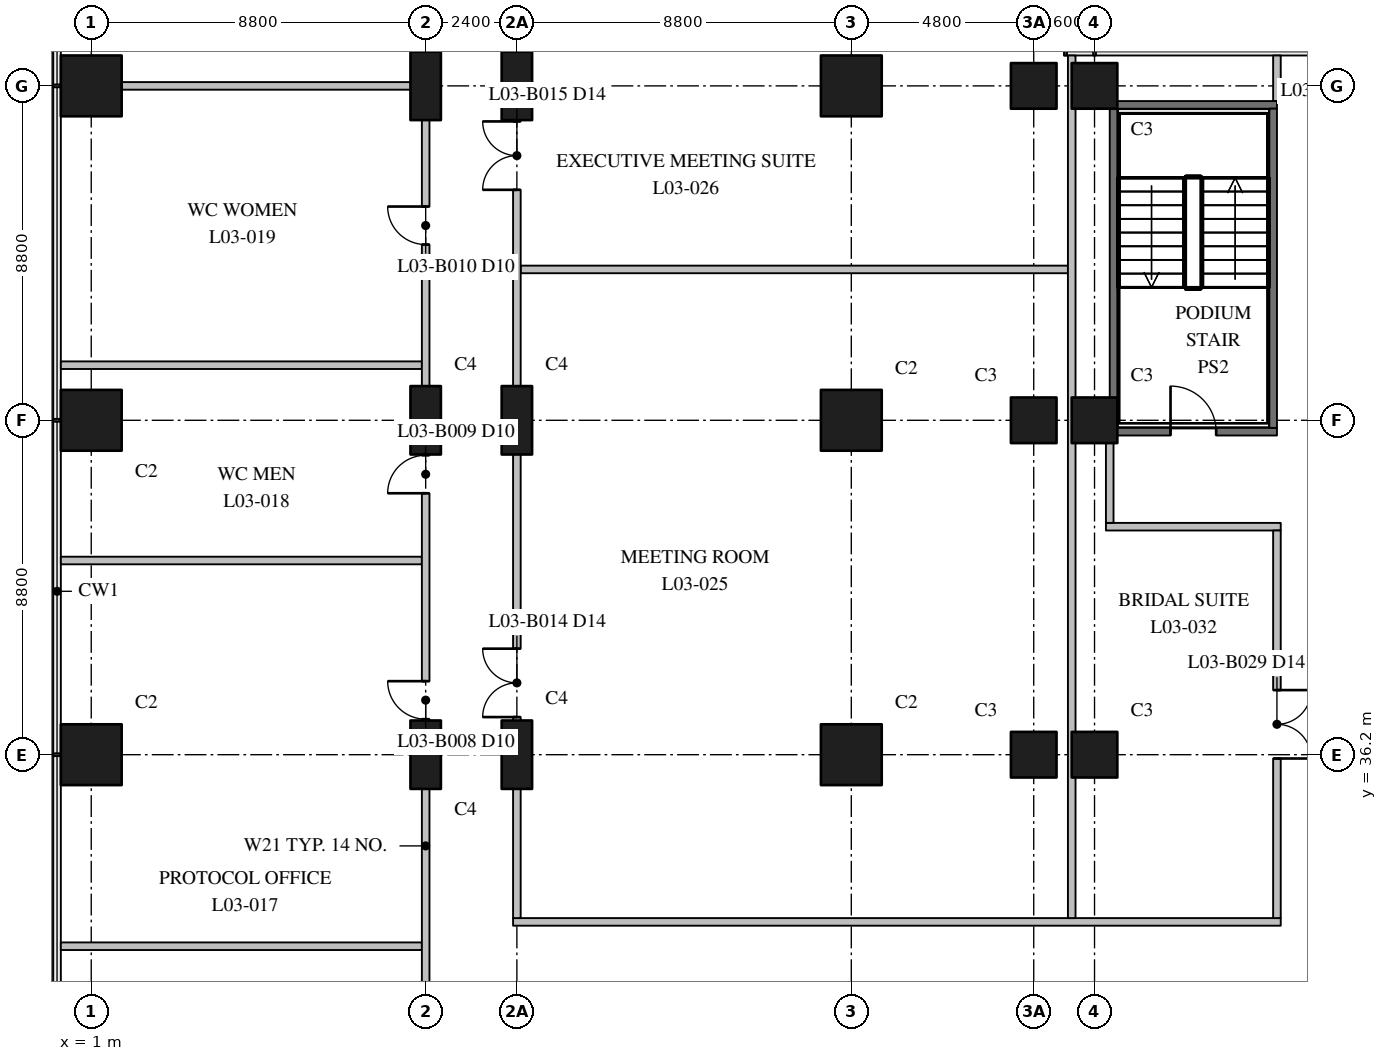
"""IFC4 building model, lengths in metres.
Left out: names, types, materials, properties, quantities, classifications, styles, units other than length and angle.
Written with IfcOpenShell. Run it as: python <this file> out.ifc"""

import sys

from ifc_helpers import new_model, si_unit, direction, frame, frame_2d, origin, origin_2d, place, context, subcontext, project, spatial, rectangle, extrude, element, fill, save


model = new_model("IFC4")
c1 = context("Model", 3, precision=1e-05, world=origin(), true_north=direction((0.0, 1.0)))
c2 = subcontext(c1, "Body", "Model", "MODEL_VIEW")
j1 = project(units=[si_unit("LENGTHUNIT", "METRE"), si_unit("PLANEANGLEUNIT", "RADIAN")], contexts=[c1])
p1 = place(None, origin())
s1 = spatial("IfcSite", under=j1, at=p1, CompositionType="ELEMENT")
p2 = place(p1, origin())
s2 = spatial("IfcBuilding", under=s1, at=p2, CompositionType="ELEMENT")
p3 = place(p2, frame((0.0, 0.0, 18.0)))
s3 = spatial("IfcBuildingStorey", under=s2, at=p3, CompositionType="ELEMENT", Elevation=18.0)
for number, where, z_axis, x_axis in (
    (1, (1.0, 36.2, 0.0), (0.0, 0.0, 1.0), (1.0, 0.0, 0.0)),
    (2, (1.0, 45.0, 0.0), (0.0, 0.0, 1.0), (1.0, 0.0, 0.0)),
    (3, (1.0, 53.8, 0.0), (0.0, 0.0, 1.0), (1.0, 0.0, 0.0)),
):
    element("IfcColumn", number, at=place(p3, frame(where, z_axis=z_axis, x_axis=x_axis)), inside=s3, PredefinedType="COLUMN", context=c2, shape_type="SweptSolid", body=[
        extrude(rectangle(XDim=1.6, YDim=1.6, at=origin_2d()), origin(), (0.0, 0.0, 1.0), 5.5),
    ])
for number, where, z_axis, x_axis in (
    (4, (9.8, 36.2, 0.0), (0.0, 0.0, 1.0), (0.0, 1.0, 0.0)),
    (5, (9.8, 45.0, 0.0), (0.0, 0.0, 1.0), (0.0, 1.0, 0.0)),
    (6, (9.8, 53.8, 0.0), (0.0, 0.0, 1.0), (0.0, 1.0, 0.0)),
    (7, (12.2, 36.2, 0.0), (0.0, 0.0, 1.0), (0.0, 1.0, 0.0)),
    (8, (12.2, 45.0, 0.0), (0.0, 0.0, 1.0), (0.0, 1.0, 0.0)),
    (9, (12.2, 53.8, 0.0), (0.0, 0.0, 1.0), (0.0, 1.0, 0.0)),
):
    element("IfcColumn", number, at=place(p3, frame(where, z_axis=z_axis, x_axis=x_axis)), inside=s3, PredefinedType="COLUMN", context=c2, shape_type="SweptSolid", body=[
        extrude(rectangle(XDim=1.8, YDim=0.8, at=origin_2d()), origin(), (0.0, 0.0, 1.0), 5.5),
    ])
for number, where, z_axis, x_axis in (
    (10, (21.0, 36.2, 0.0), (0.0, 0.0, 1.0), (1.0, 0.0, 0.0)),
    (11, (21.0, 45.0, 0.0), (0.0, 0.0, 1.0), (1.0, 0.0, 0.0)),
    (12, (21.0, 53.8, 0.0), (0.0, 0.0, 1.0), (1.0, 0.0, 0.0)),
):
    element("IfcColumn", number, at=place(p3, frame(where, z_axis=z_axis, x_axis=x_axis)), inside=s3, PredefinedType="COLUMN", context=c2, shape_type="SweptSolid", body=[
        extrude(rectangle(XDim=1.6, YDim=1.6, at=origin_2d()), origin(), (0.0, 0.0, 1.0), 5.5),
    ])
for number, where, z_axis, x_axis in (
    (13, (25.8, 36.2, 0.0), (0.0, 0.0, 1.0), (1.0, 0.0, 0.0)),
    (14, (25.8, 45.0, 0.0), (0.0, 0.0, 1.0), (1.0, 0.0, 0.0)),
    (15, (25.8, 53.8, 0.0), (0.0, 0.0, 1.0), (1.0, 0.0, 0.0)),
    (16, (27.4, 36.2, 0.0), (0.0, 0.0, 1.0), (1.0, 0.0, 0.0)),
    (17, (27.4, 45.0, 0.0), (0.0, 0.0, 1.0), (1.0, 0.0, 0.0)),
    (18, (27.4, 53.8, 0.0), (0.0, 0.0, 1.0), (1.0, 0.0, 0.0)),
):
    element("IfcColumn", number, at=place(p3, frame(where, z_axis=z_axis, x_axis=x_axis)), inside=s3, PredefinedType="COLUMN", context=c2, shape_type="SweptSolid", body=[
        extrude(rectangle(XDim=1.2, YDim=1.2, at=origin_2d()), origin(), (0.0, 0.0, 1.0), 5.5),
    ])
p4 = place(p3, frame((27.8, 44.7, 0.0), z_axis=(0.0, 0.0, 1.0), x_axis=(1.0, 0.0, 0.0)))
e19 = element("IfcWall", 19, at=p4, inside=s3, PredefinedType="SHEAR", context=c2, shape_type="SweptSolid", body=[
    extrude(rectangle(XDim=4.4, YDim=0.2, at=frame_2d((2.2, 0.0))), origin(), (0.0, 0.0, 1.0), 5.1),
])
p5 = place(p4, frame((1.6, 0.0, 0.0)))
e20 = element("IfcOpeningElement", 20, at=p5, cuts=e19, PredefinedType="OPENING", context=c2, shape_type="SweptSolid", body=[
    extrude(rectangle(XDim=1.2, YDim=2.1, at=frame_2d((0.6, 1.05))), frame((0.0, 0.11, 0.0), z_axis=(0.0, -1.0, 0.0), x_axis=(1.0, 0.0, 0.0)), (0.0, 0.0, 1.0), 0.22),
])
p6 = place(p3, frame((27.8, 53.3, 0.0), z_axis=(0.0, 0.0, 1.0), x_axis=(1.0, 0.0, 0.0)))
e21 = element("IfcWall", 21, at=p6, inside=s3, PredefinedType="SHEAR", context=c2, shape_type="SweptSolid", body=[
    extrude(rectangle(XDim=4.4, YDim=0.2, at=frame_2d((2.2, 0.0))), origin(), (0.0, 0.0, 1.0), 5.1),
])
for number, where, z_axis, x_axis in (
    (22, (27.9, 44.8, 0.0), (0.0, 0.0, 1.0), (0.0, 1.0, 0.0)),
    (23, (32.1, 44.8, 0.0), (0.0, 0.0, 1.0), (0.0, 1.0, 0.0)),
):
    element("IfcWall", number, at=place(p3, frame(where, z_axis=z_axis, x_axis=x_axis)), inside=s3, PredefinedType="SHEAR", context=c2, shape_type="SweptSolid", body=[
        extrude(rectangle(XDim=8.4, YDim=0.2, at=frame_2d((4.2, 0.0))), origin(), (0.0, 0.0, 1.0), 5.1),
    ])
p7 = place(p3, frame((12.1, 31.8, 0.0), z_axis=(0.0, 0.0, 1.0), x_axis=(1.0, 0.0, 0.0)))
e24 = element("IfcWall", 24, at=p7, inside=s3, PredefinedType="PARTITIONING", context=c2, shape_type="SweptSolid", body=[
    extrude(rectangle(XDim=20.2, YDim=0.2, at=frame_2d((10.1, 0.0))), origin(), (0.0, 0.0, 1.0), 5.1),
])
p8 = place(p3, frame((27.7, 42.2, 0.0), z_axis=(0.0, 0.0, 1.0), x_axis=(1.0, 0.0, 0.0)))
e25 = element("IfcWall", 25, at=p8, inside=s3, PredefinedType="PARTITIONING", context=c2, shape_type="SweptSolid", body=[
    extrude(rectangle(XDim=4.6, YDim=0.2, at=frame_2d((2.3, 0.0))), origin(), (0.0, 0.0, 1.0), 5.1),
])
for number, where, z_axis, x_axis in (
    (26, (0.2, 31.16, 0.0), (0.0, 0.0, 1.0), (1.0, 0.0, 0.0)),
    (27, (0.2, 41.31, 0.0), (0.0, 0.0, 1.0), (1.0, 0.0, 0.0)),
    (28, (0.2, 46.45, 0.0), (0.0, 0.0, 1.0), (1.0, 0.0, 0.0)),
    (29, (0.2, 53.8, 0.0), (0.0, 0.0, 1.0), (1.0, 0.0, 0.0)),
):
    element("IfcWall", number, at=place(p3, frame(where, z_axis=z_axis, x_axis=x_axis)), inside=s3, PredefinedType="PARTITIONING", context=c2, shape_type="SweptSolid", body=[
        extrude(rectangle(XDim=9.5, YDim=0.2, at=frame_2d((4.75, 0.0))), origin(), (0.0, 0.0, 1.0), 5.1),
    ])
p9 = place(p3, frame((12.3, 48.97, 0.0), z_axis=(0.0, 0.0, 1.0), x_axis=(1.0, 0.0, 0.0)))
e30 = element("IfcWall", 30, at=p9, inside=s3, PredefinedType="PARTITIONING", context=c2, shape_type="SweptSolid", body=[
    extrude(rectangle(XDim=14.4, YDim=0.2, at=frame_2d((7.2, 0.0))), origin(), (0.0, 0.0, 1.0), 5.1),
])
p10 = place(p3, frame((9.8, 9.8, 0.0), z_axis=(0.0, 0.0, 1.0), x_axis=(0.0, 1.0, 0.0)))
e31 = element("IfcWall", 31, at=p10, inside=s3, PredefinedType="PARTITIONING", context=c2, shape_type="SweptSolid", body=[
    extrude(rectangle(XDim=48.0, YDim=0.2, at=frame_2d((24.0, 0.0))), origin(), (0.0, 0.0, 1.0), 5.1),
])
p11 = place(p10, frame((7.635, 0.0, 0.0)))
e32 = element("IfcOpeningElement", 32, at=p11, cuts=e31, PredefinedType="OPENING", context=c2, shape_type="SweptSolid", body=[
    extrude(rectangle(XDim=1.0, YDim=2.1, at=frame_2d((0.5, 1.05))), frame((0.0, 0.11, 0.0), z_axis=(0.0, -1.0, 0.0), x_axis=(1.0, 0.0, 0.0)), (0.0, 0.0, 1.0), 0.22),
])
p12 = place(p10, frame((27.335, 0.0, 0.0)))
e33 = element("IfcOpeningElement", 33, at=p12, cuts=e31, PredefinedType="OPENING", context=c2, shape_type="SweptSolid", body=[
    extrude(rectangle(XDim=1.0, YDim=2.1, at=frame_2d((0.5, 1.05))), frame((0.0, 0.11, 0.0), z_axis=(0.0, -1.0, 0.0), x_axis=(1.0, 0.0, 0.0)), (0.0, 0.0, 1.0), 0.22),
])
p13 = place(p10, frame((33.28, 0.0, 0.0)))
e34 = element("IfcOpeningElement", 34, at=p13, cuts=e31, PredefinedType="OPENING", context=c2, shape_type="SweptSolid", body=[
    extrude(rectangle(XDim=1.0, YDim=2.1, at=frame_2d((0.5, 1.05))), frame((0.0, 0.11, 0.0), z_axis=(0.0, -1.0, 0.0), x_axis=(1.0, 0.0, 0.0)), (0.0, 0.0, 1.0), 0.22),
])
p14 = place(p10, frame((39.825, 0.0, 0.0)))
e35 = element("IfcOpeningElement", 35, at=p14, cuts=e31, PredefinedType="OPENING", context=c2, shape_type="SweptSolid", body=[
    extrude(rectangle(XDim=1.0, YDim=2.1, at=frame_2d((0.5, 1.05))), frame((0.0, 0.11, 0.0), z_axis=(0.0, -1.0, 0.0), x_axis=(1.0, 0.0, 0.0)), (0.0, 0.0, 1.0), 0.22),
])
p15 = place(p10, frame((44.967, 0.0, 0.0)))
e36 = element("IfcOpeningElement", 36, at=p15, cuts=e31, PredefinedType="OPENING", context=c2, shape_type="SweptSolid", body=[
    extrude(rectangle(XDim=1.0, YDim=2.1, at=frame_2d((0.5, 1.05))), frame((0.0, 0.11, 0.0), z_axis=(0.0, -1.0, 0.0), x_axis=(1.0, 0.0, 0.0)), (0.0, 0.0, 1.0), 0.22),
])
p16 = place(p10, frame((0.4, 0.0, 0.0)))
e37 = element("IfcOpeningElement", 37, at=p16, cuts=e31, PredefinedType="OPENING", context=c2, shape_type="SweptSolid", body=[
    extrude(rectangle(XDim=1.0, YDim=2.1, at=frame_2d((0.5, 1.05))), frame((0.0, 0.11, 0.0), z_axis=(0.0, -1.0, 0.0), x_axis=(1.0, 0.0, 0.0)), (0.0, 0.0, 1.0), 0.22),
])
p17 = place(p3, frame((12.2, 31.9, 0.0), z_axis=(0.0, 0.0, 1.0), x_axis=(0.0, 1.0, 0.0)))
e38 = element("IfcWall", 38, at=p17, inside=s3, PredefinedType="PARTITIONING", context=c2, shape_type="SweptSolid", body=[
    extrude(rectangle(XDim=46.3, YDim=0.2, at=frame_2d((23.15, 0.0))), origin(), (0.0, 0.0, 1.0), 5.1),
])
p18 = place(p17, frame((5.29, 0.0, 0.0)))
e39 = element("IfcOpeningElement", 39, at=p18, cuts=e38, PredefinedType="OPENING", context=c2, shape_type="SweptSolid", body=[
    extrude(rectangle(XDim=1.8, YDim=2.4, at=frame_2d((0.9, 1.2))), frame((0.0, 0.11, 0.0), z_axis=(0.0, -1.0, 0.0), x_axis=(1.0, 0.0, 0.0)), (0.0, 0.0, 1.0), 0.22),
])
p19 = place(p17, frame((19.165, 0.0, 0.0)))
e40 = element("IfcOpeningElement", 40, at=p19, cuts=e38, PredefinedType="OPENING", context=c2, shape_type="SweptSolid", body=[
    extrude(rectangle(XDim=1.8, YDim=2.4, at=frame_2d((0.9, 1.2))), frame((0.0, 0.11, 0.0), z_axis=(0.0, -1.0, 0.0), x_axis=(1.0, 0.0, 0.0)), (0.0, 0.0, 1.0), 0.22),
])
p20 = place(p17, frame((27.895, 0.0, 0.0)))
e41 = element("IfcOpeningElement", 41, at=p20, cuts=e38, PredefinedType="OPENING", context=c2, shape_type="SweptSolid", body=[
    extrude(rectangle(XDim=1.8, YDim=2.4, at=frame_2d((0.9, 1.2))), frame((0.0, 0.11, 0.0), z_axis=(0.0, -1.0, 0.0), x_axis=(1.0, 0.0, 0.0)), (0.0, 0.0, 1.0), 0.22),
])
p21 = place(p17, frame((35.025, 0.0, 0.0)))
e42 = element("IfcOpeningElement", 42, at=p21, cuts=e38, PredefinedType="OPENING", context=c2, shape_type="SweptSolid", body=[
    extrude(rectangle(XDim=1.0, YDim=2.1, at=frame_2d((0.5, 1.05))), frame((0.0, 0.11, 0.0), z_axis=(0.0, -1.0, 0.0), x_axis=(1.0, 0.0, 0.0)), (0.0, 0.0, 1.0), 0.22),
])
p22 = place(p17, frame((41.71, 0.0, 0.0)))
e43 = element("IfcOpeningElement", 43, at=p22, cuts=e38, PredefinedType="OPENING", context=c2, shape_type="SweptSolid", body=[
    extrude(rectangle(XDim=1.8, YDim=2.1, at=frame_2d((0.9, 1.05))), frame((0.0, 0.11, 0.0), z_axis=(0.0, -1.0, 0.0), x_axis=(1.0, 0.0, 0.0)), (0.0, 0.0, 1.0), 0.22),
])
p23 = place(p3, frame((32.2, 31.9, 0.0), z_axis=(0.0, 0.0, 1.0), x_axis=(0.0, 1.0, 0.0)))
e44 = element("IfcWall", 44, at=p23, inside=s3, PredefinedType="PARTITIONING", context=c2, shape_type="SweptSolid", body=[
    extrude(rectangle(XDim=10.2, YDim=0.2, at=frame_2d((5.1, 0.0))), origin(), (0.0, 0.0, 1.0), 5.1),
])
p24 = place(p23, frame((4.2, 0.0, 0.0)))
e45 = element("IfcOpeningElement", 45, at=p24, cuts=e44, PredefinedType="OPENING", context=c2, shape_type="SweptSolid", body=[
    extrude(rectangle(XDim=1.8, YDim=2.4, at=frame_2d((0.9, 1.2))), frame((0.0, 0.11, 0.0), z_axis=(0.0, -1.0, 0.0), x_axis=(1.0, 0.0, 0.0)), (0.0, 0.0, 1.0), 0.22),
])
p25 = place(p3, frame((32.2, 53.4, 0.0), z_axis=(0.0, 0.0, 1.0), x_axis=(0.0, 1.0, 0.0)))
e46 = element("IfcWall", 46, at=p25, inside=s3, PredefinedType="PARTITIONING", context=c2, shape_type="SweptSolid", body=[
    extrude(rectangle(XDim=1.2, YDim=0.2, at=frame_2d((0.6, 0.0))), origin(), (0.0, 0.0, 1.0), 5.1),
])
p26 = place(p3, frame((27.8, 42.3, 0.0), z_axis=(0.0, 0.0, 1.0), x_axis=(0.0, 1.0, 0.0)))
e47 = element("IfcWall", 47, at=p26, inside=s3, PredefinedType="PARTITIONING", context=c2, shape_type="SweptSolid", body=[
    extrude(rectangle(XDim=2.3, YDim=0.2, at=frame_2d((1.15, 0.0))), origin(), (0.0, 0.0, 1.0), 5.1),
])
p27 = place(p3, frame((26.8, 31.9, 0.0), z_axis=(0.0, 0.0, 1.0), x_axis=(0.0, 1.0, 0.0)))
e48 = element("IfcWall", 48, at=p27, inside=s3, PredefinedType="PARTITIONING", context=c2, shape_type="SweptSolid", body=[
    extrude(rectangle(XDim=22.7, YDim=0.2, at=frame_2d((11.35, 0.0))), origin(), (0.0, 0.0, 1.0), 5.1),
])
p28 = place(p5, origin())
e49 = element("IfcDoor", 49, at=p28, inside=s3, OperationType="SINGLE_SWING_LEFT", PredefinedType="DOOR", context=c2, shape_type="SweptSolid", body=[
    extrude(rectangle(XDim=1.2, YDim=2.1, at=frame_2d((0.6, 1.05))), frame((0.0, 0.025, 0.0), z_axis=(0.0, -1.0, 0.0), x_axis=(1.0, 0.0, 0.0)), (0.0, 0.0, 1.0), 0.05),
])
fill(e20, e49)
p29 = place(p12, origin())
e50 = element("IfcDoor", 50, at=p29, inside=s3, OperationType="SINGLE_SWING_RIGHT", PredefinedType="DOOR", context=c2, shape_type="SweptSolid", body=[
    extrude(rectangle(XDim=1.0, YDim=2.1, at=frame_2d((0.5, 1.05))), frame((0.0, 0.025, 0.0), z_axis=(0.0, -1.0, 0.0), x_axis=(1.0, 0.0, 0.0)), (0.0, 0.0, 1.0), 0.05),
])
fill(e33, e50)
p30 = place(p13, origin())
e51 = element("IfcDoor", 51, at=p30, inside=s3, OperationType="SINGLE_SWING_LEFT", PredefinedType="DOOR", context=c2, shape_type="SweptSolid", body=[
    extrude(rectangle(XDim=1.0, YDim=2.1, at=frame_2d((0.5, 1.05))), frame((0.0, 0.025, 0.0), z_axis=(0.0, -1.0, 0.0), x_axis=(1.0, 0.0, 0.0)), (0.0, 0.0, 1.0), 0.05),
])
fill(e34, e51)
p31 = place(p14, origin())
e52 = element("IfcDoor", 52, at=p31, inside=s3, OperationType="SINGLE_SWING_RIGHT", PredefinedType="DOOR", context=c2, shape_type="SweptSolid", body=[
    extrude(rectangle(XDim=1.0, YDim=2.1, at=frame_2d((0.5, 1.05))), frame((0.0, 0.025, 0.0), z_axis=(0.0, -1.0, 0.0), x_axis=(1.0, 0.0, 0.0)), (0.0, 0.0, 1.0), 0.05),
])
fill(e35, e52)
p32 = place(p18, origin())
e53 = element("IfcDoor", 53, at=p32, inside=s3, OperationType="DOUBLE_DOOR_SINGLE_SWING", PredefinedType="DOOR", context=c2, shape_type="SweptSolid", body=[
    extrude(rectangle(XDim=1.8, YDim=2.4, at=frame_2d((0.9, 1.2))), frame((0.0, 0.025, 0.0), z_axis=(0.0, -1.0, 0.0), x_axis=(1.0, 0.0, 0.0)), (0.0, 0.0, 1.0), 0.05),
])
fill(e39, e53)
p33 = place(p19, origin())
e54 = element("IfcDoor", 54, at=p33, inside=s3, OperationType="DOUBLE_DOOR_SINGLE_SWING", PredefinedType="DOOR", context=c2, shape_type="SweptSolid", body=[
    extrude(rectangle(XDim=1.8, YDim=2.4, at=frame_2d((0.9, 1.2))), frame((0.0, 0.025, 0.0), z_axis=(0.0, -1.0, 0.0), x_axis=(1.0, 0.0, 0.0)), (0.0, 0.0, 1.0), 0.05),
])
fill(e40, e54)
p34 = place(p24, frame((1.8, 0.0, 0.0), z_axis=(0.0, 0.0, 1.0), x_axis=(-1.0, 0.0, 0.0)))
e55 = element("IfcDoor", 55, at=p34, inside=s3, OperationType="DOUBLE_DOOR_SINGLE_SWING", PredefinedType="DOOR", context=c2, shape_type="SweptSolid", body=[
    extrude(rectangle(XDim=1.8, YDim=2.4, at=frame_2d((0.9, 1.2))), frame((0.0, 0.025, 0.0), z_axis=(0.0, -1.0, 0.0), x_axis=(1.0, 0.0, 0.0)), (0.0, 0.0, 1.0), 0.05),
])
fill(e45, e55)
save(model, sys.argv[1])
